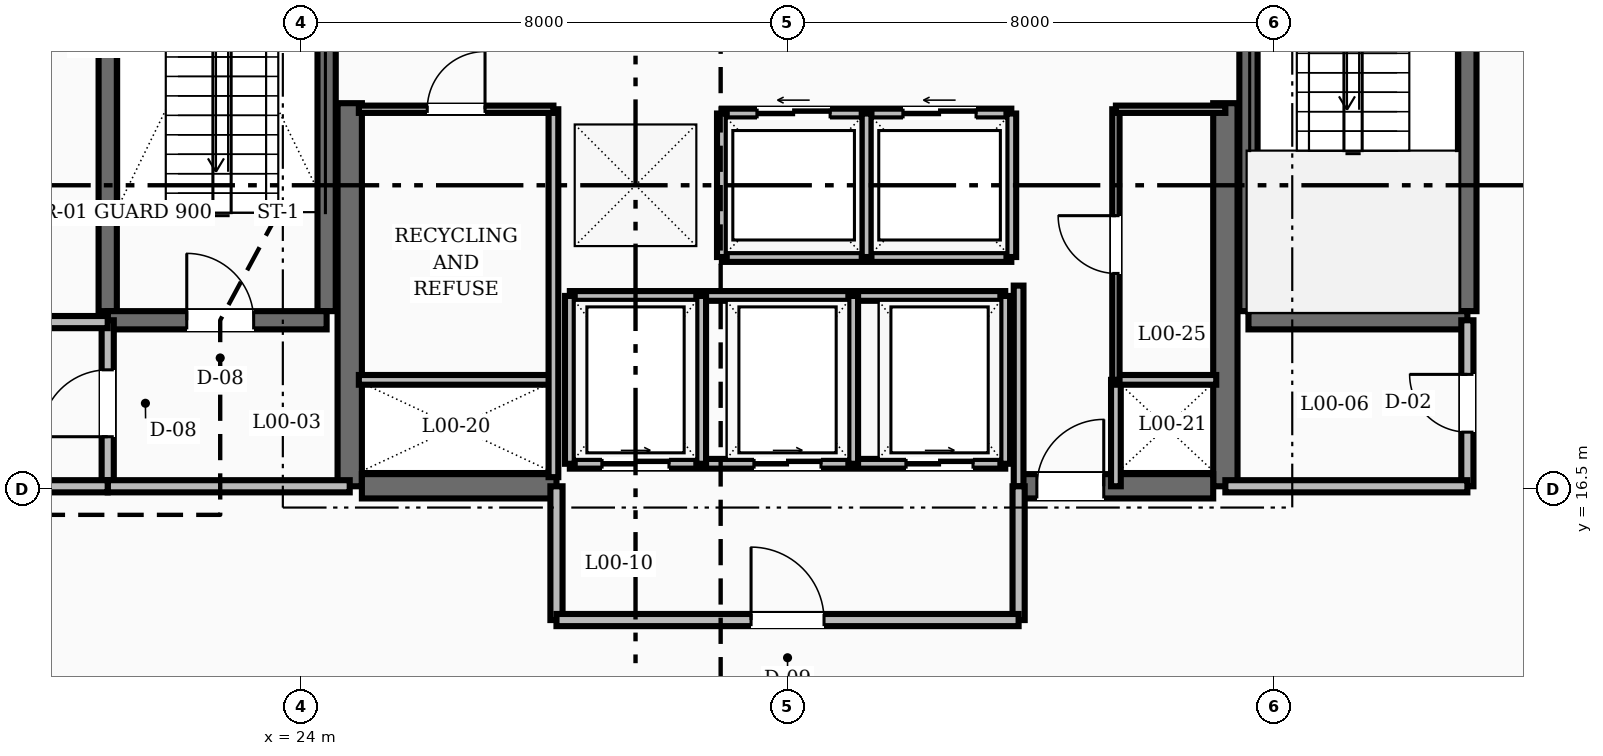
"""IFC4 building model, lengths in metres.
Left out: names, types, materials, properties, quantities, classifications, styles, units other than length and angle.
Written with IfcOpenShell. Run it as: python <this file> out.ifc"""

import sys

from ifc_helpers import new_model, si_unit, direction, frame, frame_2d, origin, place, context, subcontext, project, spatial, rectangle, extrude, element, fill, save


model = new_model("IFC4")
c1 = context("Model", 3, precision=1e-05, world=origin(), true_north=direction((0.0, 1.0)))
c2 = subcontext(c1, "Body", "Model", "MODEL_VIEW")
j1 = project(units=[si_unit("LENGTHUNIT", "METRE"), si_unit("PLANEANGLEUNIT", "RADIAN")], contexts=[c1])
p1 = place(None, origin())
s1 = spatial("IfcSite", under=j1, at=p1, CompositionType="ELEMENT")
p2 = place(p1, origin())
s2 = spatial("IfcBuilding", under=s1, at=p2, CompositionType="ELEMENT")
p3 = place(p2, origin())
s3 = spatial("IfcBuildingStorey", under=s2, at=p3, CompositionType="ELEMENT", Elevation=0.0)
for number, where, z_axis, x_axis in (
    (1, (24.8, 16.55, 0.0), (0.0, 0.0, 1.0), (0.0, 1.0, 0.0)),
    (2, (39.2, 16.55, 0.0), (0.0, 0.0, 1.0), (0.0, 1.0, 0.0)),
):
    element("IfcWall", number, at=place(p3, frame(where, z_axis=z_axis, x_axis=x_axis)), inside=s3, PredefinedType="SHEAR", context=c2, shape_type="SweptSolid", body=[
        extrude(rectangle(XDim=6.3, YDim=0.4, at=frame_2d((3.15, 0.0))), origin(), (0.0, 0.0, 1.0), 5.2),
    ])
p4 = place(p3, frame((25.0, 16.55, 0.0), z_axis=(0.0, 0.0, 1.0), x_axis=(1.0, 0.0, 0.0)))
e3 = element("IfcWall", 3, at=p4, inside=s3, PredefinedType="SHEAR", context=c2, shape_type="SweptSolid", body=[
    extrude(rectangle(XDim=3.2, YDim=0.4, at=frame_2d((1.6, 0.0))), origin(), (0.0, 0.0, 1.0), 5.2),
])
p5 = place(p3, frame((35.8, 16.55, 0.0), z_axis=(0.0, 0.0, 1.0), x_axis=(1.0, 0.0, 0.0)))
e4 = element("IfcWall", 4, at=p5, inside=s3, PredefinedType="SHEAR", context=c2, shape_type="SweptSolid", body=[
    extrude(rectangle(XDim=3.2, YDim=0.4, at=frame_2d((1.6, 0.0))), origin(), (0.0, 0.0, 1.0), 5.2),
])
p6 = place(p5, frame((0.3, 0.0, 0.0)))
e5 = element("IfcOpeningElement", 5, at=p6, cuts=e4, PredefinedType="OPENING", context=c2, shape_type="SweptSolid", body=[
    extrude(rectangle(XDim=1.1, YDim=2.1, at=frame_2d((0.55, 1.05))), frame((0.0, 0.21, 0.0), z_axis=(0.0, -1.0, 0.0), x_axis=(1.0, 0.0, 0.0)), (0.0, 0.0, 1.0), 0.42),
])
for number, where, z_axis, x_axis in (
    (6, (20.82, 19.43, 0.0), (0.0, 0.0, 1.0), (0.0, 1.0, 0.0)),
    (7, (24.42, 19.43, 0.0), (0.0, 0.0, 1.0), (0.0, 1.0, 0.0)),
):
    element("IfcWall", number, at=place(p3, frame(where, z_axis=z_axis, x_axis=x_axis)), inside=s3, PredefinedType="SHEAR", context=c2, shape_type="SweptSolid", body=[
        extrude(rectangle(XDim=8.74, YDim=0.3, at=frame_2d((4.37, 0.0))), origin(), (0.0, 0.0, 1.0), 5.2),
    ])
p7 = place(p3, frame((20.82, 19.28, 0.0), z_axis=(0.0, 0.0, 1.0), x_axis=(1.0, 0.0, 0.0)))
e8 = element("IfcWall", 8, at=p7, inside=s3, PredefinedType="SHEAR", context=c2, shape_type="SweptSolid", body=[
    extrude(rectangle(XDim=3.6, YDim=0.3, at=frame_2d((1.8, 0.0))), origin(), (0.0, 0.0, 1.0), 5.2),
])
p8 = place(p7, frame((1.3, 0.0, 0.0)))
e9 = element("IfcOpeningElement", 9, at=p8, cuts=e8, PredefinedType="OPENING", context=c2, shape_type="SweptSolid", body=[
    extrude(rectangle(XDim=1.1, YDim=2.1, at=frame_2d((0.55, 1.05))), frame((0.0, 0.16, 0.0), z_axis=(0.0, -1.0, 0.0), x_axis=(1.0, 0.0, 0.0)), (0.0, 0.0, 1.0), 0.32),
])
for number, where, z_axis, x_axis in (
    (10, (43.18, 19.43, 0.0), (0.0, 0.0, 1.0), (0.0, 1.0, 0.0)),
    (11, (39.58, 19.43, 0.0), (0.0, 0.0, 1.0), (0.0, 1.0, 0.0)),
):
    element("IfcWall", number, at=place(p3, frame(where, z_axis=z_axis, x_axis=x_axis)), inside=s3, PredefinedType="SHEAR", context=c2, shape_type="SweptSolid", body=[
        extrude(rectangle(XDim=8.74, YDim=0.3, at=frame_2d((4.37, 0.0))), origin(), (0.0, 0.0, 1.0), 5.2),
    ])
p9 = place(p3, frame((39.58, 19.28, 0.0), z_axis=(0.0, 0.0, 1.0), x_axis=(1.0, 0.0, 0.0)))
e12 = element("IfcWall", 12, at=p9, inside=s3, PredefinedType="SHEAR", context=c2, shape_type="SweptSolid", body=[
    extrude(rectangle(XDim=3.6, YDim=0.3, at=frame_2d((1.8, 0.0))), origin(), (0.0, 0.0, 1.0), 5.2),
])
p10 = place(p3, frame((20.82, 16.55, 0.0), z_axis=(0.0, 0.0, 1.0), x_axis=(0.0, 1.0, 0.0)))
e13 = element("IfcWall", 13, at=p10, inside=s3, PredefinedType="SOLIDWALL", context=c2, shape_type="SweptSolid", body=[
    extrude(rectangle(XDim=2.73, YDim=0.2, at=frame_2d((1.365, 0.0))), origin(), (0.0, 0.0, 1.0), 3.92),
])
p11 = place(p10, frame((0.815, 0.0, 0.0)))
e14 = element("IfcOpeningElement", 14, at=p11, cuts=e13, PredefinedType="OPENING", context=c2, shape_type="SweptSolid", body=[
    extrude(rectangle(XDim=1.1, YDim=2.1, at=frame_2d((0.55, 1.05))), frame((0.0, 0.11, 0.0), z_axis=(0.0, -1.0, 0.0), x_axis=(1.0, 0.0, 0.0)), (0.0, 0.0, 1.0), 0.22),
])
p12 = place(p3, frame((20.82, 16.55, 0.0), z_axis=(0.0, 0.0, 1.0), x_axis=(1.0, 0.0, 0.0)))
e15 = element("IfcWall", 15, at=p12, inside=s3, PredefinedType="SOLIDWALL", context=c2, shape_type="SweptSolid", body=[
    extrude(rectangle(XDim=3.98, YDim=0.2, at=frame_2d((1.99, 0.0))), origin(), (0.0, 0.0, 1.0), 3.92),
])
p13 = place(p3, frame((43.18, 16.55, 0.0), z_axis=(0.0, 0.0, 1.0), x_axis=(0.0, 1.0, 0.0)))
e16 = element("IfcWall", 16, at=p13, inside=s3, PredefinedType="SOLIDWALL", context=c2, shape_type="SweptSolid", body=[
    extrude(rectangle(XDim=2.73, YDim=0.2, at=frame_2d((1.365, 0.0))), origin(), (0.0, 0.0, 1.0), 3.92),
])
p14 = place(p13, frame((0.89, 0.0, 0.0)))
e17 = element("IfcOpeningElement", 17, at=p14, cuts=e16, PredefinedType="OPENING", context=c2, shape_type="SweptSolid", body=[
    extrude(rectangle(XDim=0.95, YDim=2.1, at=frame_2d((0.475, 1.05))), frame((0.0, 0.11, 0.0), z_axis=(0.0, -1.0, 0.0), x_axis=(1.0, 0.0, 0.0)), (0.0, 0.0, 1.0), 0.22),
])
p15 = place(p3, frame((39.2, 16.55, 0.0), z_axis=(0.0, 0.0, 1.0), x_axis=(1.0, 0.0, 0.0)))
e18 = element("IfcWall", 18, at=p15, inside=s3, PredefinedType="SOLIDWALL", context=c2, shape_type="SweptSolid", body=[
    extrude(rectangle(XDim=3.98, YDim=0.2, at=frame_2d((1.99, 0.0))), origin(), (0.0, 0.0, 1.0), 3.92),
])
p16 = place(p3, frame((35.8, 16.55, 0.0), z_axis=(0.0, 0.0, 1.0), x_axis=(0.0, 1.0, 0.0)))
e19 = element("IfcWall", 19, at=p16, inside=s3, PredefinedType="SOLIDWALL", context=c2, shape_type="SweptSolid", body=[
    extrude(rectangle(XDim=3.3, YDim=0.16, at=frame_2d((1.65, 0.0))), origin(), (0.0, 0.0, 1.0), 3.92),
])
p17 = place(p3, frame((37.4, 16.55, 0.0), z_axis=(0.0, 0.0, 1.0), x_axis=(0.0, 1.0, 0.0)))
e20 = element("IfcWall", 20, at=p17, inside=s3, PredefinedType="SOLIDWALL", context=c2, shape_type="SweptSolid", body=[
    extrude(rectangle(XDim=1.75, YDim=0.16, at=frame_2d((0.875, 0.0))), origin(), (0.0, 0.0, 1.0), 3.92),
])
for number, where, z_axis, x_axis in (
    (21, (28.2, 14.35, 0.0), (0.0, 0.0, 1.0), (0.0, 1.0, 0.0)),
    (22, (35.8, 14.35, 0.0), (0.0, 0.0, 1.0), (0.0, 1.0, 0.0)),
):
    element("IfcWall", number, at=place(p3, frame(where, z_axis=z_axis, x_axis=x_axis)), inside=s3, PredefinedType="SOLIDWALL", context=c2, shape_type="SweptSolid", body=[
        extrude(rectangle(XDim=2.2, YDim=0.2, at=frame_2d((1.1, 0.0))), origin(), (0.0, 0.0, 1.0), 3.92),
    ])
p18 = place(p3, frame((28.2, 14.35, 0.0), z_axis=(0.0, 0.0, 1.0), x_axis=(1.0, 0.0, 0.0)))
e23 = element("IfcWall", 23, at=p18, inside=s3, PredefinedType="SOLIDWALL", context=c2, shape_type="SweptSolid", body=[
    extrude(rectangle(XDim=7.6, YDim=0.2, at=frame_2d((3.8, 0.0))), origin(), (0.0, 0.0, 1.0), 3.92),
])
p19 = place(p18, frame((3.2, 0.0, 0.0)))
e24 = element("IfcOpeningElement", 24, at=p19, cuts=e23, PredefinedType="OPENING", context=c2, shape_type="SweptSolid", body=[
    extrude(rectangle(XDim=1.2, YDim=2.1, at=frame_2d((0.6, 1.05))), frame((0.0, 0.11, 0.0), z_axis=(0.0, -1.0, 0.0), x_axis=(1.0, 0.0, 0.0)), (0.0, 0.0, 1.0), 0.22),
])
p20 = place(p3, frame((30.92, 22.68, 0.0), z_axis=(0.0, 0.0, 1.0), x_axis=(1.0, 0.0, 0.0)))
e25 = element("IfcWall", 25, at=p20, inside=s3, PredefinedType="SOLIDWALL", context=c2, shape_type="SweptSolid", body=[
    extrude(rectangle(XDim=4.76, YDim=0.16, at=frame_2d((2.38, 0.0))), origin(), (0.0, 0.0, 1.0), 3.92),
])
p21 = place(p20, frame((0.58, 0.0, 0.0)))
e26 = element("IfcOpeningElement", 26, at=p21, cuts=e25, PredefinedType="OPENING", context=c2, shape_type="SweptSolid", body=[
    extrude(rectangle(XDim=1.2, YDim=2.15, at=frame_2d((0.6, 1.075))), frame((0.0, 0.09, 0.0), z_axis=(0.0, -1.0, 0.0), x_axis=(1.0, 0.0, 0.0)), (0.0, 0.0, 1.0), 0.18),
])
p22 = place(p20, frame((2.98, 0.0, 0.0)))
e27 = element("IfcOpeningElement", 27, at=p22, cuts=e25, PredefinedType="OPENING", context=c2, shape_type="SweptSolid", body=[
    extrude(rectangle(XDim=1.2, YDim=2.15, at=frame_2d((0.6, 1.075))), frame((0.0, 0.09, 0.0), z_axis=(0.0, -1.0, 0.0), x_axis=(1.0, 0.0, 0.0)), (0.0, 0.0, 1.0), 0.18),
])
p23 = place(p3, frame((30.92, 20.32, 0.0), z_axis=(0.0, 0.0, 1.0), x_axis=(1.0, 0.0, 0.0)))
e28 = element("IfcWall", 28, at=p23, inside=s3, PredefinedType="SOLIDWALL", context=c2, shape_type="SweptSolid", body=[
    extrude(rectangle(XDim=4.76, YDim=0.16, at=frame_2d((2.38, 0.0))), origin(), (0.0, 0.0, 1.0), 3.92),
])
for number, where, z_axis, x_axis in (
    (29, (30.92, 20.32, 0.0), (0.0, 0.0, 1.0), (0.0, 1.0, 0.0)),
    (30, (33.3, 20.32, 0.0), (0.0, 0.0, 1.0), (0.0, 1.0, 0.0)),
    (31, (35.68, 20.32, 0.0), (0.0, 0.0, 1.0), (0.0, 1.0, 0.0)),
):
    element("IfcWall", number, at=place(p3, frame(where, z_axis=z_axis, x_axis=x_axis)), inside=s3, PredefinedType="SOLIDWALL", context=c2, shape_type="SweptSolid", body=[
        extrude(rectangle(XDim=2.36, YDim=0.16, at=frame_2d((1.18, 0.0))), origin(), (0.0, 0.0, 1.0), 3.92),
    ])
p24 = place(p3, frame((28.42, 16.92, 0.0), z_axis=(0.0, 0.0, 1.0), x_axis=(1.0, 0.0, 0.0)))
e32 = element("IfcWall", 32, at=p24, inside=s3, PredefinedType="SOLIDWALL", context=c2, shape_type="SweptSolid", body=[
    extrude(rectangle(XDim=7.16, YDim=0.16, at=frame_2d((3.58, 0.0))), origin(), (0.0, 0.0, 1.0), 3.92),
])
p25 = place(p24, frame((0.53, 0.0, 0.0)))
e33 = element("IfcOpeningElement", 33, at=p25, cuts=e32, PredefinedType="OPENING", context=c2, shape_type="SweptSolid", body=[
    extrude(rectangle(XDim=1.1, YDim=2.15, at=frame_2d((0.55, 1.075))), frame((0.0, 0.09, 0.0), z_axis=(0.0, -1.0, 0.0), x_axis=(1.0, 0.0, 0.0)), (0.0, 0.0, 1.0), 0.18),
])
p26 = place(p24, frame((3.03, 0.0, 0.0)))
e34 = element("IfcOpeningElement", 34, at=p26, cuts=e32, PredefinedType="OPENING", context=c2, shape_type="SweptSolid", body=[
    extrude(rectangle(XDim=1.1, YDim=2.15, at=frame_2d((0.55, 1.075))), frame((0.0, 0.09, 0.0), z_axis=(0.0, -1.0, 0.0), x_axis=(1.0, 0.0, 0.0)), (0.0, 0.0, 1.0), 0.18),
])
p27 = place(p24, frame((5.53, 0.0, 0.0)))
e35 = element("IfcOpeningElement", 35, at=p27, cuts=e32, PredefinedType="OPENING", context=c2, shape_type="SweptSolid", body=[
    extrude(rectangle(XDim=1.1, YDim=2.15, at=frame_2d((0.55, 1.075))), frame((0.0, 0.09, 0.0), z_axis=(0.0, -1.0, 0.0), x_axis=(1.0, 0.0, 0.0)), (0.0, 0.0, 1.0), 0.18),
])
p28 = place(p3, frame((28.42, 19.68, 0.0), z_axis=(0.0, 0.0, 1.0), x_axis=(1.0, 0.0, 0.0)))
e36 = element("IfcWall", 36, at=p28, inside=s3, PredefinedType="SOLIDWALL", context=c2, shape_type="SweptSolid", body=[
    extrude(rectangle(XDim=7.16, YDim=0.16, at=frame_2d((3.58, 0.0))), origin(), (0.0, 0.0, 1.0), 3.92),
])
for number, where, z_axis, x_axis in (
    (37, (28.42, 16.92, 0.0), (0.0, 0.0, 1.0), (0.0, 1.0, 0.0)),
    (38, (30.58, 16.92, 0.0), (0.0, 0.0, 1.0), (0.0, 1.0, 0.0)),
    (39, (33.08, 16.92, 0.0), (0.0, 0.0, 1.0), (0.0, 1.0, 0.0)),
    (40, (35.58, 16.92, 0.0), (0.0, 0.0, 1.0), (0.0, 1.0, 0.0)),
):
    element("IfcWall", number, at=place(p3, frame(where, z_axis=z_axis, x_axis=x_axis)), inside=s3, PredefinedType="SOLIDWALL", context=c2, shape_type="SweptSolid", body=[
        extrude(rectangle(XDim=2.76, YDim=0.16, at=frame_2d((1.38, 0.0))), origin(), (0.0, 0.0, 1.0), 3.92),
    ])
p29 = place(p3, frame((24.95, 18.3, 0.0), z_axis=(0.0, 0.0, 1.0), x_axis=(1.0, 0.0, 0.0)))
e41 = element("IfcWall", 41, at=p29, inside=s3, PredefinedType="SOLIDWALL", context=c2, shape_type="SweptSolid", body=[
    extrude(rectangle(XDim=3.2, YDim=0.16, at=frame_2d((1.6, 0.0))), origin(), (0.0, 0.0, 1.0), 3.92),
])
p30 = place(p3, frame((28.15, 16.7, 0.0), z_axis=(0.0, 0.0, 1.0), x_axis=(0.0, 1.0, 0.0)))
e42 = element("IfcWall", 42, at=p30, inside=s3, PredefinedType="SOLIDWALL", context=c2, shape_type="SweptSolid", body=[
    extrude(rectangle(XDim=6.05, YDim=0.16, at=frame_2d((3.025, 0.0))), origin(), (0.0, 0.0, 1.0), 3.92),
])
p31 = place(p3, frame((37.4, 18.3, 0.0), z_axis=(0.0, 0.0, 1.0), x_axis=(1.0, 0.0, 0.0)))
e43 = element("IfcWall", 43, at=p31, inside=s3, PredefinedType="SOLIDWALL", context=c2, shape_type="SweptSolid", body=[
    extrude(rectangle(XDim=1.65, YDim=0.16, at=frame_2d((0.825, 0.0))), origin(), (0.0, 0.0, 1.0), 3.92),
])
p32 = place(p3, frame((24.95, 22.75, 0.0), z_axis=(0.0, 0.0, 1.0), x_axis=(1.0, 0.0, 0.0)))
e44 = element("IfcWall", 44, at=p32, inside=s3, PredefinedType="PARTITIONING", context=c2, shape_type="SweptSolid", body=[
    extrude(rectangle(XDim=3.2, YDim=0.12, at=frame_2d((1.6, 0.0))), origin(), (0.0, 0.0, 1.0), 3.92),
])
p33 = place(p32, frame((1.125, 0.0, 0.0)))
e45 = element("IfcOpeningElement", 45, at=p33, cuts=e44, PredefinedType="OPENING", context=c2, shape_type="SweptSolid", body=[
    extrude(rectangle(XDim=0.95, YDim=2.1, at=frame_2d((0.475, 1.05))), frame((0.0, 0.07, 0.0), z_axis=(0.0, -1.0, 0.0), x_axis=(1.0, 0.0, 0.0)), (0.0, 0.0, 1.0), 0.14),
])
p34 = place(p3, frame((37.4, 18.3, 0.0), z_axis=(0.0, 0.0, 1.0), x_axis=(0.0, 1.0, 0.0)))
e46 = element("IfcWall", 46, at=p34, inside=s3, PredefinedType="PARTITIONING", context=c2, shape_type="SweptSolid", body=[
    extrude(rectangle(XDim=4.45, YDim=0.12, at=frame_2d((2.225, 0.0))), origin(), (0.0, 0.0, 1.0), 3.92),
])
p35 = place(p34, frame((1.75, 0.0, 0.0)))
e47 = element("IfcOpeningElement", 47, at=p35, cuts=e46, PredefinedType="OPENING", context=c2, shape_type="SweptSolid", body=[
    extrude(rectangle(XDim=0.95, YDim=2.1, at=frame_2d((0.475, 1.05))), frame((0.0, 0.07, 0.0), z_axis=(0.0, -1.0, 0.0), x_axis=(1.0, 0.0, 0.0)), (0.0, 0.0, 1.0), 0.14),
])
p36 = place(p3, frame((37.4, 22.75, 0.0), z_axis=(0.0, 0.0, 1.0), x_axis=(1.0, 0.0, 0.0)))
e48 = element("IfcWall", 48, at=p36, inside=s3, PredefinedType="PARTITIONING", context=c2, shape_type="SweptSolid", body=[
    extrude(rectangle(XDim=1.8, YDim=0.12, at=frame_2d((0.9, 0.0))), origin(), (0.0, 0.0, 1.0), 3.92),
])
p37 = place(p3, frame((4.08, 16.55, 0.0), z_axis=(0.0, 0.0, 1.0), x_axis=(1.0, 0.0, 0.0)))
e49 = element("IfcWall", 49, at=p37, inside=s3, PredefinedType="SOLIDWALL", context=c2, shape_type="SweptSolid", body=[
    extrude(rectangle(XDim=16.74, YDim=0.2, at=frame_2d((8.37, 0.0))), origin(), (0.0, 0.0, 1.0), 3.92),
])
p38 = place(p37, frame((10.5, 0.0, 0.0)))
e50 = element("IfcOpeningElement", 50, at=p38, cuts=e49, PredefinedType="OPENING", context=c2, shape_type="SweptSolid", body=[
    extrude(rectangle(XDim=1.1, YDim=2.1, at=frame_2d((0.55, 1.05))), frame((0.0, 0.11, 0.0), z_axis=(0.0, -1.0, 0.0), x_axis=(1.0, 0.0, 0.0)), (0.0, 0.0, 1.0), 0.22),
])
p39 = place(p3, frame((4.08, 19.25, 0.0), z_axis=(0.0, 0.0, 1.0), x_axis=(1.0, 0.0, 0.0)))
e51 = element("IfcWall", 51, at=p39, inside=s3, PredefinedType="SOLIDWALL", context=c2, shape_type="SweptSolid", body=[
    extrude(rectangle(XDim=16.74, YDim=0.2, at=frame_2d((8.37, 0.0))), origin(), (0.0, 0.0, 1.0), 3.92),
])
p40 = place(p8, origin())
e52 = element("IfcDoor", 52, at=p40, inside=s3, OperationType="SINGLE_SWING_LEFT", PredefinedType="DOOR", context=c2, shape_type="SweptSolid", body=[
    extrude(rectangle(XDim=1.1, YDim=2.1, at=frame_2d((0.55, 1.05))), frame((0.0, 0.025, 0.0), z_axis=(0.0, -1.0, 0.0), x_axis=(1.0, 0.0, 0.0)), (0.0, 0.0, 1.0), 0.05),
])
fill(e9, e52)
p41 = place(p11, origin())
e53 = element("IfcDoor", 53, at=p41, inside=s3, OperationType="SINGLE_SWING_LEFT", PredefinedType="DOOR", context=c2, shape_type="SweptSolid", body=[
    extrude(rectangle(XDim=1.1, YDim=2.1, at=frame_2d((0.55, 1.05))), frame((0.0, 0.025, 0.0), z_axis=(0.0, -1.0, 0.0), x_axis=(1.0, 0.0, 0.0)), (0.0, 0.0, 1.0), 0.05),
])
fill(e14, e53)
p42 = place(p14, origin())
e54 = element("IfcDoor", 54, at=p42, inside=s3, OperationType="SINGLE_SWING_RIGHT", PredefinedType="DOOR", context=c2, shape_type="SweptSolid", body=[
    extrude(rectangle(XDim=0.95, YDim=2.1, at=frame_2d((0.475, 1.05))), frame((0.0, 0.025, 0.0), z_axis=(0.0, -1.0, 0.0), x_axis=(1.0, 0.0, 0.0)), (0.0, 0.0, 1.0), 0.05),
])
fill(e17, e54)
p43 = place(p6, origin())
e55 = element("IfcDoor", 55, at=p43, inside=s3, OperationType="SINGLE_SWING_RIGHT", PredefinedType="DOOR", context=c2, shape_type="SweptSolid", body=[
    extrude(rectangle(XDim=1.1, YDim=2.1, at=frame_2d((0.55, 1.05))), frame((0.0, 0.025, 0.0), z_axis=(0.0, -1.0, 0.0), x_axis=(1.0, 0.0, 0.0)), (0.0, 0.0, 1.0), 0.05),
])
fill(e5, e55)
p44 = place(p19, origin())
e56 = element("IfcDoor", 56, at=p44, inside=s3, OperationType="SINGLE_SWING_LEFT", PredefinedType="DOOR", context=c2, shape_type="SweptSolid", body=[
    extrude(rectangle(XDim=1.2, YDim=2.1, at=frame_2d((0.6, 1.05))), frame((0.0, 0.025, 0.0), z_axis=(0.0, -1.0, 0.0), x_axis=(1.0, 0.0, 0.0)), (0.0, 0.0, 1.0), 0.05),
])
fill(e24, e56)
p45 = place(p21, origin())
e57 = element("IfcDoor", 57, at=p45, inside=s3, OperationType="SLIDING_TO_LEFT", PredefinedType="DOOR", context=c2, shape_type="SweptSolid", body=[
    extrude(rectangle(XDim=1.2, YDim=2.15, at=frame_2d((0.6, 1.075))), frame((0.0, 0.025, 0.0), z_axis=(0.0, -1.0, 0.0), x_axis=(1.0, 0.0, 0.0)), (0.0, 0.0, 1.0), 0.05),
])
fill(e26, e57)
p46 = place(p22, origin())
e58 = element("IfcDoor", 58, at=p46, inside=s3, OperationType="SLIDING_TO_LEFT", PredefinedType="DOOR", context=c2, shape_type="SweptSolid", body=[
    extrude(rectangle(XDim=1.2, YDim=2.15, at=frame_2d((0.6, 1.075))), frame((0.0, 0.025, 0.0), z_axis=(0.0, -1.0, 0.0), x_axis=(1.0, 0.0, 0.0)), (0.0, 0.0, 1.0), 0.05),
])
fill(e27, e58)
p47 = place(p25, origin())
e59 = element("IfcDoor", 59, at=p47, inside=s3, OperationType="SLIDING_TO_RIGHT", PredefinedType="DOOR", context=c2, shape_type="SweptSolid", body=[
    extrude(rectangle(XDim=1.1, YDim=2.15, at=frame_2d((0.55, 1.075))), frame((0.0, 0.025, 0.0), z_axis=(0.0, -1.0, 0.0), x_axis=(1.0, 0.0, 0.0)), (0.0, 0.0, 1.0), 0.05),
])
fill(e33, e59)
p48 = place(p26, origin())
e60 = element("IfcDoor", 60, at=p48, inside=s3, OperationType="SLIDING_TO_RIGHT", PredefinedType="DOOR", context=c2, shape_type="SweptSolid", body=[
    extrude(rectangle(XDim=1.1, YDim=2.15, at=frame_2d((0.55, 1.075))), frame((0.0, 0.025, 0.0), z_axis=(0.0, -1.0, 0.0), x_axis=(1.0, 0.0, 0.0)), (0.0, 0.0, 1.0), 0.05),
])
fill(e34, e60)
p49 = place(p27, origin())
e61 = element("IfcDoor", 61, at=p49, inside=s3, OperationType="SLIDING_TO_RIGHT", PredefinedType="DOOR", context=c2, shape_type="SweptSolid", body=[
    extrude(rectangle(XDim=1.1, YDim=2.15, at=frame_2d((0.55, 1.075))), frame((0.0, 0.025, 0.0), z_axis=(0.0, -1.0, 0.0), x_axis=(1.0, 0.0, 0.0)), (0.0, 0.0, 1.0), 0.05),
])
fill(e35, e61)
p50 = place(p33, origin())
e62 = element("IfcDoor", 62, at=p50, inside=s3, OperationType="SINGLE_SWING_RIGHT", PredefinedType="DOOR", context=c2, shape_type="SweptSolid", body=[
    extrude(rectangle(XDim=0.95, YDim=2.1, at=frame_2d((0.475, 1.05))), frame((0.0, 0.025, 0.0), z_axis=(0.0, -1.0, 0.0), x_axis=(1.0, 0.0, 0.0)), (0.0, 0.0, 1.0), 0.05),
])
fill(e45, e62)
p51 = place(p35, origin())
e63 = element("IfcDoor", 63, at=p51, inside=s3, OperationType="SINGLE_SWING_RIGHT", PredefinedType="DOOR", context=c2, shape_type="SweptSolid", body=[
    extrude(rectangle(XDim=0.95, YDim=2.1, at=frame_2d((0.475, 1.05))), frame((0.0, 0.025, 0.0), z_axis=(0.0, -1.0, 0.0), x_axis=(1.0, 0.0, 0.0)), (0.0, 0.0, 1.0), 0.05),
])
fill(e47, e63)
save(model, sys.argv[1])
